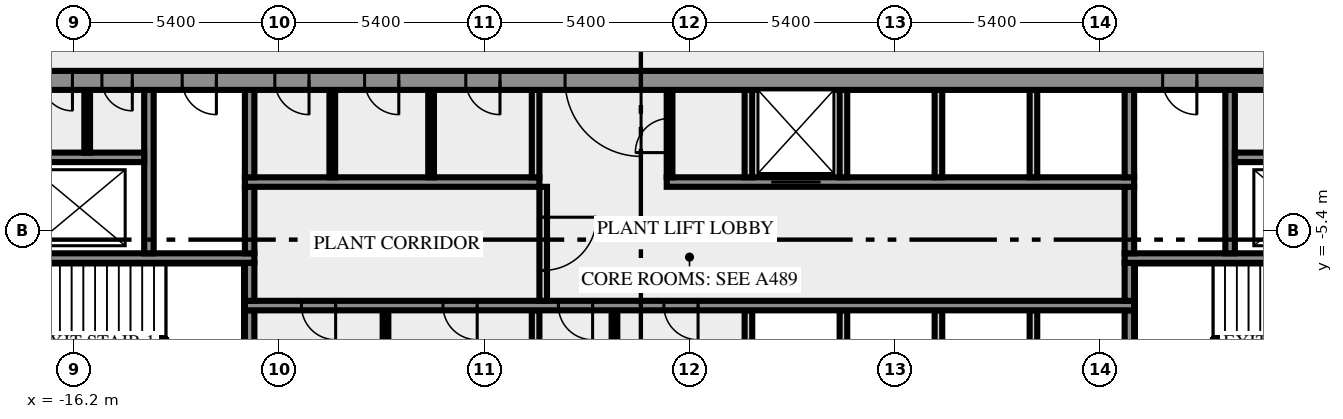
"""IFC4 building model, lengths in metres.
Left out: names, types, materials, properties, quantities, classifications, styles, units other than length and angle.
Written with IfcOpenShell. Run it as: python <this file> out.ifc"""

import sys

from ifc_helpers import new_model, si_unit, direction, frame, frame_2d, origin, place, context, subcontext, project, spatial, rectangle, extrude, element, fill, save


model = new_model("IFC4")
c1 = context("Model", 3, precision=1e-05, world=origin(), true_north=direction((0.0, 1.0)))
c2 = subcontext(c1, "Body", "Model", "MODEL_VIEW")
j1 = project(units=[si_unit("LENGTHUNIT", "METRE"), si_unit("PLANEANGLEUNIT", "RADIAN")], contexts=[c1])
p1 = place(None, origin())
s1 = spatial("IfcSite", under=j1, at=p1, CompositionType="ELEMENT")
p2 = place(p1, origin())
s2 = spatial("IfcBuilding", under=s1, at=p2, CompositionType="ELEMENT")
p3 = place(p2, frame((0.0, 0.0, 188.0)))
s3 = spatial("IfcBuildingStorey", under=s2, at=p3, CompositionType="ELEMENT", Elevation=188.0)
p4 = place(p3, frame((-11.575, -10.5, 0.0), z_axis=(0.0, 0.0, 1.0), x_axis=(0.0, 1.0, 0.0)))
e1 = element("IfcWall", 1, at=p4, inside=s3, PredefinedType="SHEAR", context=c2, shape_type="SweptSolid", body=[
    extrude(rectangle(XDim=3.0, YDim=0.25, at=frame_2d((1.5, 0.0))), origin(), (0.0, 0.0, 1.0), 5.65),
])
p5 = place(p3, frame((-8.0, -10.5, 0.0), z_axis=(0.0, 0.0, 1.0), x_axis=(0.0, 1.0, 0.0)))
e2 = element("IfcWall", 2, at=p5, inside=s3, PredefinedType="PARTITIONING", context=c2, shape_type="SweptSolid", body=[
    extrude(rectangle(XDim=3.0, YDim=0.15, at=frame_2d((1.5, 0.0))), origin(), (0.0, 0.0, 1.0), 5.65),
])
p6 = place(p3, frame((-4.05, -10.5, 0.0), z_axis=(0.0, 0.0, 1.0), x_axis=(0.0, 1.0, 0.0)))
e3 = element("IfcWall", 3, at=p6, inside=s3, PredefinedType="SOLIDWALL", context=c2, shape_type="SweptSolid", body=[
    extrude(rectangle(XDim=3.0, YDim=0.2, at=frame_2d((1.5, 0.0))), origin(), (0.0, 0.0, 1.0), 5.65),
])
p7 = place(p3, frame((-1.975, -10.5, 0.0), z_axis=(0.0, 0.0, 1.0), x_axis=(0.0, 1.0, 0.0)))
e4 = element("IfcWall", 4, at=p7, inside=s3, PredefinedType="PARTITIONING", context=c2, shape_type="SweptSolid", body=[
    extrude(rectangle(XDim=3.0, YDim=0.15, at=frame_2d((1.5, 0.0))), origin(), (0.0, 0.0, 1.0), 5.65),
])
for number, where, z_axis, x_axis in (
    (5, (1.55, -10.5, 0.0), (0.0, 0.0, 1.0), (0.0, 1.0, 0.0)),
    (6, (4.05, -10.5, 0.0), (0.0, 0.0, 1.0), (0.0, 1.0, 0.0)),
    (7, (6.55, -10.5, 0.0), (0.0, 0.0, 1.0), (0.0, 1.0, 0.0)),
    (8, (9.05, -10.5, 0.0), (0.0, 0.0, 1.0), (0.0, 1.0, 0.0)),
):
    element("IfcWall", number, at=place(p3, frame(where, z_axis=z_axis, x_axis=x_axis)), inside=s3, PredefinedType="SOLIDWALL", context=c2, shape_type="SweptSolid", body=[
        extrude(rectangle(XDim=3.0, YDim=0.2, at=frame_2d((1.5, 0.0))), origin(), (0.0, 0.0, 1.0), 5.65),
    ])
p8 = place(p3, frame((11.575, -10.5, 0.0), z_axis=(0.0, 0.0, 1.0), x_axis=(0.0, 1.0, 0.0)))
e9 = element("IfcWall", 9, at=p8, inside=s3, PredefinedType="SHEAR", context=c2, shape_type="SweptSolid", body=[
    extrude(rectangle(XDim=3.0, YDim=0.25, at=frame_2d((1.5, 0.0))), origin(), (0.0, 0.0, 1.0), 5.65),
])
p9 = place(p3, frame((11.7, -7.375, 0.0), z_axis=(0.0, 0.0, 1.0), x_axis=(-1.0, 0.0, 0.0)))
e10 = element("IfcWall", 10, at=p9, inside=s3, PredefinedType="SHEAR", context=c2, shape_type="SweptSolid", body=[
    extrude(rectangle(XDim=23.4, YDim=0.25, at=frame_2d((11.7, 0.0))), origin(), (0.0, 0.0, 1.0), 5.65),
])
p10 = place(p9, frame((21.012, 0.0, 0.0)))
e11 = element("IfcOpeningElement", 11, at=p10, cuts=e10, PredefinedType="OPENING", context=c2, shape_type="SweptSolid", body=[
    extrude(rectangle(XDim=0.9, YDim=2.1, at=frame_2d((0.45, 1.05))), frame((0.0, 0.135, 0.0), z_axis=(0.0, -1.0, 0.0), x_axis=(1.0, 0.0, 0.0)), (0.0, 0.0, 1.0), 0.27),
])
p11 = place(p9, frame((17.287, 0.0, 0.0)))
e12 = element("IfcOpeningElement", 12, at=p11, cuts=e10, PredefinedType="OPENING", context=c2, shape_type="SweptSolid", body=[
    extrude(rectangle(XDim=0.9, YDim=2.1, at=frame_2d((0.45, 1.05))), frame((0.0, 0.135, 0.0), z_axis=(0.0, -1.0, 0.0), x_axis=(1.0, 0.0, 0.0)), (0.0, 0.0, 1.0), 0.27),
])
p12 = place(p9, frame((14.25, 0.0, 0.0)))
e13 = element("IfcOpeningElement", 13, at=p12, cuts=e10, PredefinedType="OPENING", context=c2, shape_type="SweptSolid", body=[
    extrude(rectangle(XDim=0.9, YDim=2.1, at=frame_2d((0.45, 1.05))), frame((0.0, 0.135, 0.0), z_axis=(0.0, -1.0, 0.0), x_axis=(1.0, 0.0, 0.0)), (0.0, 0.0, 1.0), 0.27),
])
p13 = place(p9, frame((11.475, 0.0, 0.0)))
e14 = element("IfcOpeningElement", 14, at=p13, cuts=e10, PredefinedType="OPENING", context=c2, shape_type="SweptSolid", body=[
    extrude(rectangle(XDim=0.9, YDim=2.1, at=frame_2d((0.45, 1.05))), frame((0.0, 0.135, 0.0), z_axis=(0.0, -1.0, 0.0), x_axis=(1.0, 0.0, 0.0)), (0.0, 0.0, 1.0), 0.27),
])
p14 = place(p3, frame((-11.575, -7.25, 0.0), z_axis=(0.0, 0.0, 1.0), x_axis=(0.0, 1.0, 0.0)))
e15 = element("IfcWall", 15, at=p14, inside=s3, PredefinedType="SHEAR", context=c2, shape_type="SweptSolid", body=[
    extrude(rectangle(XDim=1.0, YDim=0.25, at=frame_2d((0.5, 0.0))), origin(), (0.0, 0.0, 1.0), 5.65),
])
p15 = place(p3, frame((-3.85, -4.25, 0.0), z_axis=(0.0, 0.0, 1.0), x_axis=(0.0, -1.0, 0.0)))
e16 = element("IfcWall", 16, at=p15, inside=s3, PredefinedType="SOLIDWALL", context=c2, shape_type="SweptSolid", body=[
    extrude(rectangle(XDim=3.0, YDim=0.2, at=frame_2d((1.5, 0.0))), origin(), (0.0, 0.0, 1.0), 5.65),
])
p16 = place(p15, frame((0.8, 0.0, 0.0)))
e17 = element("IfcOpeningElement", 17, at=p16, cuts=e16, PredefinedType="OPENING", context=c2, shape_type="SweptSolid", body=[
    extrude(rectangle(XDim=1.4, YDim=2.1, at=frame_2d((0.7, 1.05))), frame((0.0, 0.11, 0.0), z_axis=(0.0, -1.0, 0.0), x_axis=(1.0, 0.0, 0.0)), (0.0, 0.0, 1.0), 0.22),
])
p17 = place(p3, frame((11.575, -7.25, 0.0), z_axis=(0.0, 0.0, 1.0), x_axis=(0.0, 1.0, 0.0)))
e18 = element("IfcWall", 18, at=p17, inside=s3, PredefinedType="SHEAR", context=c2, shape_type="SweptSolid", body=[
    extrude(rectangle(XDim=1.0, YDim=0.25, at=frame_2d((0.5, 0.0))), origin(), (0.0, 0.0, 1.0), 5.65),
])
p18 = place(p3, frame((-11.45, -6.125, 0.0), z_axis=(0.0, 0.0, 1.0), x_axis=(-1.0, 0.0, 0.0)))
e19 = element("IfcWall", 19, at=p18, inside=s3, PredefinedType="SHEAR", context=c2, shape_type="SweptSolid", body=[
    extrude(rectangle(XDim=8.05, YDim=0.25, at=frame_2d((4.025, 0.0))), origin(), (0.0, 0.0, 1.0), 5.65),
])
p19 = place(p18, frame((6.2, 0.0, 0.0)))
e20 = element("IfcOpeningElement", 20, at=p19, cuts=e19, PredefinedType="OPENING", context=c2, shape_type="SweptSolid", body=[
    extrude(rectangle(XDim=1.8, YDim=2.1, at=frame_2d((0.9, 1.05))), frame((0.0, 0.135, 0.0), z_axis=(0.0, -1.0, 0.0), x_axis=(1.0, 0.0, 0.0)), (0.0, 0.0, 1.0), 0.27),
])
p20 = place(p3, frame((19.5, -6.125, 0.0), z_axis=(0.0, 0.0, 1.0), x_axis=(-1.0, 0.0, 0.0)))
e21 = element("IfcWall", 21, at=p20, inside=s3, PredefinedType="SHEAR", context=c2, shape_type="SweptSolid", body=[
    extrude(rectangle(XDim=8.05, YDim=0.25, at=frame_2d((4.025, 0.0))), origin(), (0.0, 0.0, 1.0), 5.65),
])
p21 = place(p20, frame((0.05, 0.0, 0.0)))
e22 = element("IfcOpeningElement", 22, at=p21, cuts=e21, PredefinedType="OPENING", context=c2, shape_type="SweptSolid", body=[
    extrude(rectangle(XDim=1.8, YDim=2.1, at=frame_2d((0.9, 1.05))), frame((0.0, 0.135, 0.0), z_axis=(0.0, -1.0, 0.0), x_axis=(1.0, 0.0, 0.0)), (0.0, 0.0, 1.0), 0.27),
])
p22 = place(p3, frame((-14.225, -6.0, 0.0), z_axis=(0.0, 0.0, 1.0), x_axis=(0.0, 1.0, 0.0)))
e23 = element("IfcWall", 23, at=p22, inside=s3, PredefinedType="SHEAR", context=c2, shape_type="SweptSolid", body=[
    extrude(rectangle(XDim=4.3, YDim=0.25, at=frame_2d((2.15, 0.0))), origin(), (0.0, 0.0, 1.0), 5.65),
])
for number, where, z_axis, x_axis in (
    (24, (-11.575, -6.0, 0.0), (0.0, 0.0, 1.0), (0.0, 1.0, 0.0)),
    (25, (11.575, -6.0, 0.0), (0.0, 0.0, 1.0), (0.0, 1.0, 0.0)),
):
    element("IfcWall", number, at=place(p3, frame(where, z_axis=z_axis, x_axis=x_axis)), inside=s3, PredefinedType="SHEAR", context=c2, shape_type="SweptSolid", body=[
        extrude(rectangle(XDim=1.75, YDim=0.25, at=frame_2d((0.875, 0.0))), origin(), (0.0, 0.0, 1.0), 5.65),
    ])
p23 = place(p3, frame((14.225, -6.0, 0.0), z_axis=(0.0, 0.0, 1.0), x_axis=(0.0, 1.0, 0.0)))
e26 = element("IfcWall", 26, at=p23, inside=s3, PredefinedType="SHEAR", context=c2, shape_type="SweptSolid", body=[
    extrude(rectangle(XDim=4.3, YDim=0.25, at=frame_2d((2.15, 0.0))), origin(), (0.0, 0.0, 1.0), 5.65),
])
p24 = place(p3, frame((-11.7, -4.125, 0.0), z_axis=(0.0, 0.0, 1.0), x_axis=(1.0, 0.0, 0.0)))
e27 = element("IfcWall", 27, at=p24, inside=s3, PredefinedType="SHEAR", context=c2, shape_type="SweptSolid", body=[
    extrude(rectangle(XDim=7.75, YDim=0.25, at=frame_2d((3.875, 0.0))), origin(), (0.0, 0.0, 1.0), 5.65),
])
p25 = place(p3, frame((-0.6, -4.125, 0.0), z_axis=(0.0, 0.0, 1.0), x_axis=(1.0, 0.0, 0.0)))
e28 = element("IfcWall", 28, at=p25, inside=s3, PredefinedType="SHEAR", context=c2, shape_type="SweptSolid", body=[
    extrude(rectangle(XDim=12.3, YDim=0.25, at=frame_2d((6.15, 0.0))), origin(), (0.0, 0.0, 1.0), 5.65),
])
p26 = place(p25, frame((2.75, 0.0, 0.0)))
e29 = element("IfcOpeningElement", 29, at=p26, cuts=e28, PredefinedType="OPENING", context=c2, shape_type="SweptSolid", body=[
    extrude(rectangle(XDim=1.3, YDim=2.1, at=frame_2d((0.65, 1.05))), frame((0.0, 0.135, 0.0), z_axis=(0.0, -1.0, 0.0), x_axis=(1.0, 0.0, 0.0)), (0.0, 0.0, 1.0), 0.27),
])
p27 = place(p3, frame((-11.575, -4.0, 0.0), z_axis=(0.0, 0.0, 1.0), x_axis=(0.0, 1.0, 0.0)))
e30 = element("IfcWall", 30, at=p27, inside=s3, PredefinedType="SHEAR", context=c2, shape_type="SweptSolid", body=[
    extrude(rectangle(XDim=2.3, YDim=0.25, at=frame_2d((1.15, 0.0))), origin(), (0.0, 0.0, 1.0), 5.65),
])
for number, where, z_axis, x_axis in (
    (31, (-9.4, -4.0, 0.0), (0.0, 0.0, 1.0), (0.0, 1.0, 0.0)),
    (32, (-6.8, -4.0, 0.0), (0.0, 0.0, 1.0), (0.0, 1.0, 0.0)),
):
    element("IfcWall", number, at=place(p3, frame(where, z_axis=z_axis, x_axis=x_axis)), inside=s3, PredefinedType="PARTITIONING", context=c2, shape_type="SweptSolid", body=[
        extrude(rectangle(XDim=2.3, YDim=0.15, at=frame_2d((1.15, 0.0))), origin(), (0.0, 0.0, 1.0), 5.65),
    ])
p28 = place(p3, frame((-4.05, -4.0, 0.0), z_axis=(0.0, 0.0, 1.0), x_axis=(0.0, 1.0, 0.0)))
e33 = element("IfcWall", 33, at=p28, inside=s3, PredefinedType="SOLIDWALL", context=c2, shape_type="SweptSolid", body=[
    extrude(rectangle(XDim=2.3, YDim=0.2, at=frame_2d((1.15, 0.0))), origin(), (0.0, 0.0, 1.0), 5.65),
])
p29 = place(p3, frame((-0.525, -4.0, 0.0), z_axis=(0.0, 0.0, 1.0), x_axis=(0.0, 1.0, 0.0)))
e34 = element("IfcWall", 34, at=p29, inside=s3, PredefinedType="PARTITIONING", context=c2, shape_type="SweptSolid", body=[
    extrude(rectangle(XDim=2.3, YDim=0.15, at=frame_2d((1.15, 0.0))), origin(), (0.0, 0.0, 1.0), 5.65),
])
p30 = place(p29, frame((0.65, 0.0, 0.0)))
e35 = element("IfcOpeningElement", 35, at=p30, cuts=e34, PredefinedType="OPENING", context=c2, shape_type="SweptSolid", body=[
    extrude(rectangle(XDim=0.9, YDim=2.1, at=frame_2d((0.45, 1.05))), frame((0.0, 0.085, 0.0), z_axis=(0.0, -1.0, 0.0), x_axis=(1.0, 0.0, 0.0)), (0.0, 0.0, 1.0), 0.17),
])
for number, where, z_axis, x_axis in (
    (36, (1.55, -4.0, 0.0), (0.0, 0.0, 1.0), (0.0, 1.0, 0.0)),
    (37, (4.05, -4.0, 0.0), (0.0, 0.0, 1.0), (0.0, 1.0, 0.0)),
    (38, (6.55, -4.0, 0.0), (0.0, 0.0, 1.0), (0.0, 1.0, 0.0)),
    (39, (9.05, -4.0, 0.0), (0.0, 0.0, 1.0), (0.0, 1.0, 0.0)),
):
    element("IfcWall", number, at=place(p3, frame(where, z_axis=z_axis, x_axis=x_axis)), inside=s3, PredefinedType="SOLIDWALL", context=c2, shape_type="SweptSolid", body=[
        extrude(rectangle(XDim=2.3, YDim=0.2, at=frame_2d((1.15, 0.0))), origin(), (0.0, 0.0, 1.0), 5.65),
    ])
p31 = place(p3, frame((11.575, -4.0, 0.0), z_axis=(0.0, 0.0, 1.0), x_axis=(0.0, 1.0, 0.0)))
e40 = element("IfcWall", 40, at=p31, inside=s3, PredefinedType="SHEAR", context=c2, shape_type="SweptSolid", body=[
    extrude(rectangle(XDim=2.3, YDim=0.25, at=frame_2d((1.15, 0.0))), origin(), (0.0, 0.0, 1.0), 5.65),
])
for number, where, z_axis, x_axis in (
    (41, (-17.35, -3.475, 0.0), (0.0, 0.0, 1.0), (1.0, 0.0, 0.0)),
    (42, (14.35, -3.475, 0.0), (0.0, 0.0, 1.0), (1.0, 0.0, 0.0)),
):
    element("IfcWall", number, at=place(p3, frame(where, z_axis=z_axis, x_axis=x_axis)), inside=s3, PredefinedType="SHEAR", context=c2, shape_type="SweptSolid", body=[
        extrude(rectangle(XDim=3.0, YDim=0.25, at=frame_2d((1.5, 0.0))), origin(), (0.0, 0.0, 1.0), 5.65),
    ])
p32 = place(p3, frame((-15.85, -3.35, 0.0), z_axis=(0.0, 0.0, 1.0), x_axis=(0.0, 1.0, 0.0)))
e43 = element("IfcWall", 43, at=p32, inside=s3, PredefinedType="PARTITIONING", context=c2, shape_type="SweptSolid", body=[
    extrude(rectangle(XDim=1.65, YDim=0.15, at=frame_2d((0.825, 0.0))), origin(), (0.0, 0.0, 1.0), 5.65),
])
p33 = place(p3, frame((20.49, -1.45, 0.0), z_axis=(0.0, 0.0, 1.0), x_axis=(-1.0, 0.0, 0.0)))
e44 = element("IfcWall", 44, at=p33, inside=s3, PredefinedType="SHEAR", context=c2, shape_type="SweptSolid", body=[
    extrude(rectangle(XDim=40.98, YDim=0.5, at=frame_2d((20.49, 0.0))), origin(), (0.0, 0.0, 1.0), 5.65),
])
p34 = place(p33, frame((38.14, 0.0, 0.0)))
e45 = element("IfcOpeningElement", 45, at=p34, cuts=e44, PredefinedType="OPENING", context=c2, shape_type="SweptSolid", body=[
    extrude(rectangle(XDim=1.8, YDim=2.1, at=frame_2d((0.9, 1.05))), frame((0.0, 0.26, 0.0), z_axis=(0.0, -1.0, 0.0), x_axis=(1.0, 0.0, 0.0)), (0.0, 0.0, 1.0), 0.52),
])
p35 = place(p33, frame((36.728, 0.0, 0.0)))
e46 = element("IfcOpeningElement", 46, at=p35, cuts=e44, PredefinedType="OPENING", context=c2, shape_type="SweptSolid", body=[
    extrude(rectangle(XDim=0.8, YDim=2.1, at=frame_2d((0.4, 1.05))), frame((0.0, 0.26, 0.0), z_axis=(0.0, -1.0, 0.0), x_axis=(1.0, 0.0, 0.0)), (0.0, 0.0, 1.0), 0.52),
])
p36 = place(p33, frame((35.153, 0.0, 0.0)))
e47 = element("IfcOpeningElement", 47, at=p36, cuts=e44, PredefinedType="OPENING", context=c2, shape_type="SweptSolid", body=[
    extrude(rectangle(XDim=0.8, YDim=2.1, at=frame_2d((0.4, 1.05))), frame((0.0, 0.26, 0.0), z_axis=(0.0, -1.0, 0.0), x_axis=(1.0, 0.0, 0.0)), (0.0, 0.0, 1.0), 0.52),
])
p37 = place(p33, frame((32.94, 0.0, 0.0)))
e48 = element("IfcOpeningElement", 48, at=p37, cuts=e44, PredefinedType="OPENING", context=c2, shape_type="SweptSolid", body=[
    extrude(rectangle(XDim=0.9, YDim=2.1, at=frame_2d((0.45, 1.05))), frame((0.0, 0.26, 0.0), z_axis=(0.0, -1.0, 0.0), x_axis=(1.0, 0.0, 0.0)), (0.0, 0.0, 1.0), 0.52),
])
p38 = place(p33, frame((30.502, 0.0, 0.0)))
e49 = element("IfcOpeningElement", 49, at=p38, cuts=e44, PredefinedType="OPENING", context=c2, shape_type="SweptSolid", body=[
    extrude(rectangle(XDim=0.9, YDim=2.1, at=frame_2d((0.45, 1.05))), frame((0.0, 0.26, 0.0), z_axis=(0.0, -1.0, 0.0), x_axis=(1.0, 0.0, 0.0)), (0.0, 0.0, 1.0), 0.52),
])
p39 = place(p33, frame((28.14, 0.0, 0.0)))
e50 = element("IfcOpeningElement", 50, at=p39, cuts=e44, PredefinedType="OPENING", context=c2, shape_type="SweptSolid", body=[
    extrude(rectangle(XDim=0.9, YDim=2.1, at=frame_2d((0.45, 1.05))), frame((0.0, 0.26, 0.0), z_axis=(0.0, -1.0, 0.0), x_axis=(1.0, 0.0, 0.0)), (0.0, 0.0, 1.0), 0.52),
])
p40 = place(p33, frame((25.478, 0.0, 0.0)))
e51 = element("IfcOpeningElement", 51, at=p40, cuts=e44, PredefinedType="OPENING", context=c2, shape_type="SweptSolid", body=[
    extrude(rectangle(XDim=0.9, YDim=2.1, at=frame_2d((0.45, 1.05))), frame((0.0, 0.26, 0.0), z_axis=(0.0, -1.0, 0.0), x_axis=(1.0, 0.0, 0.0)), (0.0, 0.0, 1.0), 0.52),
])
p41 = place(p33, frame((21.765, 0.0, 0.0)))
e52 = element("IfcOpeningElement", 52, at=p41, cuts=e44, PredefinedType="OPENING", context=c2, shape_type="SweptSolid", body=[
    extrude(rectangle(XDim=2.0, YDim=2.1, at=frame_2d((1.0, 1.05))), frame((0.0, 0.26, 0.0), z_axis=(0.0, -1.0, 0.0), x_axis=(1.0, 0.0, 0.0)), (0.0, 0.0, 1.0), 0.52),
])
p42 = place(p33, frame((7.14, 0.0, 0.0)))
e53 = element("IfcOpeningElement", 53, at=p42, cuts=e44, PredefinedType="OPENING", context=c2, shape_type="SweptSolid", body=[
    extrude(rectangle(XDim=0.9, YDim=2.1, at=frame_2d((0.45, 1.05))), frame((0.0, 0.26, 0.0), z_axis=(0.0, -1.0, 0.0), x_axis=(1.0, 0.0, 0.0)), (0.0, 0.0, 1.0), 0.52),
])
p43 = place(p33, frame((4.19, 0.0, 0.0)))
e54 = element("IfcOpeningElement", 54, at=p43, cuts=e44, PredefinedType="OPENING", context=c2, shape_type="SweptSolid", body=[
    extrude(rectangle(XDim=0.9, YDim=2.1, at=frame_2d((0.45, 1.05))), frame((0.0, 0.26, 0.0), z_axis=(0.0, -1.0, 0.0), x_axis=(1.0, 0.0, 0.0)), (0.0, 0.0, 1.0), 0.52),
])
p44 = place(p33, frame((1.04, 0.0, 0.0)))
e55 = element("IfcOpeningElement", 55, at=p44, cuts=e44, PredefinedType="OPENING", context=c2, shape_type="SweptSolid", body=[
    extrude(rectangle(XDim=1.8, YDim=2.1, at=frame_2d((0.9, 1.05))), frame((0.0, 0.26, 0.0), z_axis=(0.0, -1.0, 0.0), x_axis=(1.0, 0.0, 0.0)), (0.0, 0.0, 1.0), 0.52),
])
p45 = place(p10, origin())
e56 = element("IfcDoor", 56, at=p45, inside=s3, OperationType="SINGLE_SWING_RIGHT", PredefinedType="DOOR", context=c2, shape_type="SweptSolid", body=[
    extrude(rectangle(XDim=0.9, YDim=2.1, at=frame_2d((0.45, 1.05))), frame((0.0, 0.025, 0.0), z_axis=(0.0, -1.0, 0.0), x_axis=(1.0, 0.0, 0.0)), (0.0, 0.0, 1.0), 0.05),
])
fill(e11, e56)
p46 = place(p11, origin())
e57 = element("IfcDoor", 57, at=p46, inside=s3, OperationType="SINGLE_SWING_RIGHT", PredefinedType="DOOR", context=c2, shape_type="SweptSolid", body=[
    extrude(rectangle(XDim=0.9, YDim=2.1, at=frame_2d((0.45, 1.05))), frame((0.0, 0.025, 0.0), z_axis=(0.0, -1.0, 0.0), x_axis=(1.0, 0.0, 0.0)), (0.0, 0.0, 1.0), 0.05),
])
fill(e12, e57)
p47 = place(p12, origin())
e58 = element("IfcDoor", 58, at=p47, inside=s3, OperationType="SINGLE_SWING_RIGHT", PredefinedType="DOOR", context=c2, shape_type="SweptSolid", body=[
    extrude(rectangle(XDim=0.9, YDim=2.1, at=frame_2d((0.45, 1.05))), frame((0.0, 0.025, 0.0), z_axis=(0.0, -1.0, 0.0), x_axis=(1.0, 0.0, 0.0)), (0.0, 0.0, 1.0), 0.05),
])
fill(e13, e58)
p48 = place(p13, origin())
e59 = element("IfcDoor", 59, at=p48, inside=s3, OperationType="SINGLE_SWING_RIGHT", PredefinedType="DOOR", context=c2, shape_type="SweptSolid", body=[
    extrude(rectangle(XDim=0.9, YDim=2.1, at=frame_2d((0.45, 1.05))), frame((0.0, 0.025, 0.0), z_axis=(0.0, -1.0, 0.0), x_axis=(1.0, 0.0, 0.0)), (0.0, 0.0, 1.0), 0.05),
])
fill(e14, e59)
p49 = place(p16, origin())
e60 = element("IfcDoor", 60, at=p49, inside=s3, OperationType="DOUBLE_DOOR_SINGLE_SWING", PredefinedType="DOOR", context=c2, shape_type="SweptSolid", body=[
    extrude(rectangle(XDim=1.4, YDim=2.1, at=frame_2d((0.7, 1.05))), frame((0.0, 0.025, 0.0), z_axis=(0.0, -1.0, 0.0), x_axis=(1.0, 0.0, 0.0)), (0.0, 0.0, 1.0), 0.05),
])
fill(e17, e60)
p50 = place(p26, origin())
e61 = element("IfcDoor", 61, at=p50, inside=s3, OperationType="DOUBLE_DOOR_SLIDING", PredefinedType="DOOR", context=c2, shape_type="SweptSolid", body=[
    extrude(rectangle(XDim=1.3, YDim=2.1, at=frame_2d((0.65, 1.05))), frame((0.0, 0.025, 0.0), z_axis=(0.0, -1.0, 0.0), x_axis=(1.0, 0.0, 0.0)), (0.0, 0.0, 1.0), 0.05),
])
fill(e29, e61)
p51 = place(p30, origin())
e62 = element("IfcDoor", 62, at=p51, inside=s3, OperationType="SINGLE_SWING_LEFT", PredefinedType="DOOR", context=c2, shape_type="SweptSolid", body=[
    extrude(rectangle(XDim=0.9, YDim=2.1, at=frame_2d((0.45, 1.05))), frame((0.0, 0.025, 0.0), z_axis=(0.0, -1.0, 0.0), x_axis=(1.0, 0.0, 0.0)), (0.0, 0.0, 1.0), 0.05),
])
fill(e35, e62)
p52 = place(p35, origin())
e63 = element("IfcDoor", 63, at=p52, inside=s3, OperationType="SINGLE_SWING_RIGHT", PredefinedType="DOOR", context=c2, shape_type="SweptSolid", body=[
    extrude(rectangle(XDim=0.8, YDim=2.1, at=frame_2d((0.4, 1.05))), frame((0.0, 0.025, 0.0), z_axis=(0.0, -1.0, 0.0), x_axis=(1.0, 0.0, 0.0)), (0.0, 0.0, 1.0), 0.05),
])
fill(e46, e63)
p53 = place(p36, origin())
e64 = element("IfcDoor", 64, at=p53, inside=s3, OperationType="SINGLE_SWING_RIGHT", PredefinedType="DOOR", context=c2, shape_type="SweptSolid", body=[
    extrude(rectangle(XDim=0.8, YDim=2.1, at=frame_2d((0.4, 1.05))), frame((0.0, 0.025, 0.0), z_axis=(0.0, -1.0, 0.0), x_axis=(1.0, 0.0, 0.0)), (0.0, 0.0, 1.0), 0.05),
])
fill(e47, e64)
p54 = place(p37, origin())
e65 = element("IfcDoor", 65, at=p54, inside=s3, OperationType="SINGLE_SWING_RIGHT", PredefinedType="DOOR", context=c2, shape_type="SweptSolid", body=[
    extrude(rectangle(XDim=0.9, YDim=2.1, at=frame_2d((0.45, 1.05))), frame((0.0, 0.025, 0.0), z_axis=(0.0, -1.0, 0.0), x_axis=(1.0, 0.0, 0.0)), (0.0, 0.0, 1.0), 0.05),
])
fill(e48, e65)
p55 = place(p38, origin())
e66 = element("IfcDoor", 66, at=p55, inside=s3, OperationType="SINGLE_SWING_RIGHT", PredefinedType="DOOR", context=c2, shape_type="SweptSolid", body=[
    extrude(rectangle(XDim=0.9, YDim=2.1, at=frame_2d((0.45, 1.05))), frame((0.0, 0.025, 0.0), z_axis=(0.0, -1.0, 0.0), x_axis=(1.0, 0.0, 0.0)), (0.0, 0.0, 1.0), 0.05),
])
fill(e49, e66)
p56 = place(p39, origin())
e67 = element("IfcDoor", 67, at=p56, inside=s3, OperationType="SINGLE_SWING_RIGHT", PredefinedType="DOOR", context=c2, shape_type="SweptSolid", body=[
    extrude(rectangle(XDim=0.9, YDim=2.1, at=frame_2d((0.45, 1.05))), frame((0.0, 0.025, 0.0), z_axis=(0.0, -1.0, 0.0), x_axis=(1.0, 0.0, 0.0)), (0.0, 0.0, 1.0), 0.05),
])
fill(e50, e67)
p57 = place(p40, origin())
e68 = element("IfcDoor", 68, at=p57, inside=s3, OperationType="SINGLE_SWING_RIGHT", PredefinedType="DOOR", context=c2, shape_type="SweptSolid", body=[
    extrude(rectangle(XDim=0.9, YDim=2.1, at=frame_2d((0.45, 1.05))), frame((0.0, 0.025, 0.0), z_axis=(0.0, -1.0, 0.0), x_axis=(1.0, 0.0, 0.0)), (0.0, 0.0, 1.0), 0.05),
])
fill(e51, e68)
p58 = place(p41, origin())
e69 = element("IfcDoor", 69, at=p58, inside=s3, OperationType="DOUBLE_DOOR_SINGLE_SWING", PredefinedType="DOOR", context=c2, shape_type="SweptSolid", body=[
    extrude(rectangle(XDim=2.0, YDim=2.1, at=frame_2d((1.0, 1.05))), frame((0.0, 0.025, 0.0), z_axis=(0.0, -1.0, 0.0), x_axis=(1.0, 0.0, 0.0)), (0.0, 0.0, 1.0), 0.05),
])
fill(e52, e69)
p59 = place(p42, origin())
e70 = element("IfcDoor", 70, at=p59, inside=s3, OperationType="SINGLE_SWING_LEFT", PredefinedType="DOOR", context=c2, shape_type="SweptSolid", body=[
    extrude(rectangle(XDim=0.9, YDim=2.1, at=frame_2d((0.45, 1.05))), frame((0.0, 0.025, 0.0), z_axis=(0.0, -1.0, 0.0), x_axis=(1.0, 0.0, 0.0)), (0.0, 0.0, 1.0), 0.05),
])
fill(e53, e70)
save(model, sys.argv[1])
